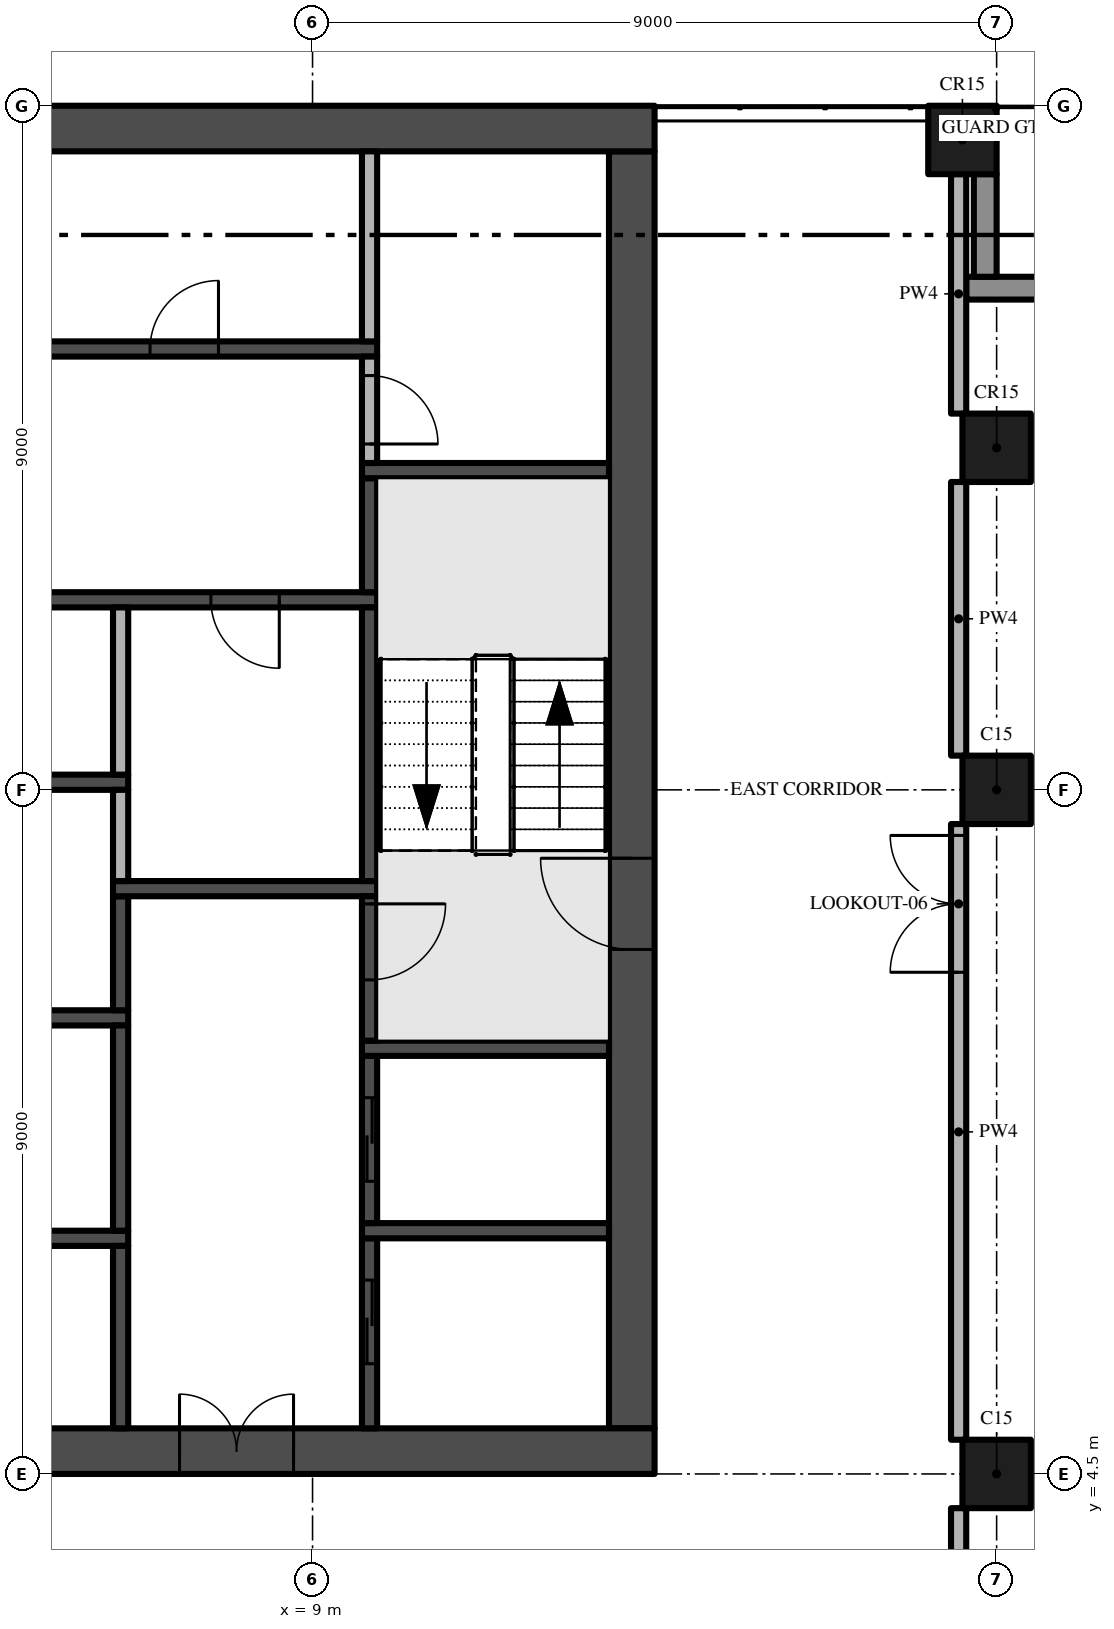
"""IFC4 building model, lengths in metres.
Left out: names, types, materials, properties, quantities, classifications, styles, units other than length and angle.
Written with IfcOpenShell. Run it as: python <this file> out.ifc"""

import sys

from ifc_helpers import new_model, si_unit, direction, frame, frame_2d, origin, origin_2d, place, context, subcontext, project, spatial, rectangle, extrude, element, fill, save


model = new_model("IFC4")
c1 = context("Model", 3, precision=1e-05, world=origin(), true_north=direction((0.0, 1.0)))
c2 = subcontext(c1, "Body", "Model", "MODEL_VIEW")
j1 = project(units=[si_unit("LENGTHUNIT", "METRE"), si_unit("PLANEANGLEUNIT", "RADIAN")], contexts=[c1])
p1 = place(None, origin())
s1 = spatial("IfcSite", under=j1, at=p1, CompositionType="ELEMENT")
p2 = place(p1, origin())
s2 = spatial("IfcBuilding", under=s1, at=p2, CompositionType="ELEMENT")
p3 = place(p2, frame((0.0, 0.0, 297.4)))
s3 = spatial("IfcBuildingStorey", under=s2, at=p3, CompositionType="ELEMENT", Elevation=297.4)
p4 = place(p3, frame((-13.5, 4.8, -0.3), z_axis=(0.0, 0.0, 1.0), x_axis=(1.0, 0.0, 0.0)))
e1 = element("IfcWall", 1, at=p4, inside=s3, PredefinedType="SHEAR", context=c2, shape_type="SweptSolid", body=[
    extrude(rectangle(XDim=27.0, YDim=0.6, at=frame_2d((13.5, 0.0))), origin(), (0.0, 0.0, 1.0), 5.95),
])
p5 = place(p4, frame((12.0, 0.0, 0.3)))
e2 = element("IfcOpeningElement", 2, at=p5, cuts=e1, PredefinedType="OPENING", context=c2, shape_type="SweptSolid", body=[
    extrude(rectangle(XDim=3.0, YDim=2.4, at=frame_2d((1.5, 1.2))), frame((0.0, 0.31, 0.0), z_axis=(0.0, -1.0, 0.0), x_axis=(1.0, 0.0, 0.0)), (0.0, 0.0, 1.0), 0.62),
])
p6 = place(p4, frame((4.9, 0.0, 0.3)))
e3 = element("IfcOpeningElement", 3, at=p6, cuts=e1, PredefinedType="OPENING", context=c2, shape_type="SweptSolid", body=[
    extrude(rectangle(XDim=1.2, YDim=2.2, at=frame_2d((0.6, 1.1))), frame((0.0, 0.31, 0.0), z_axis=(0.0, -1.0, 0.0), x_axis=(1.0, 0.0, 0.0)), (0.0, 0.0, 1.0), 0.62),
])
p7 = place(p4, frame((20.75, 0.0, 0.3)))
e4 = element("IfcOpeningElement", 4, at=p7, cuts=e1, PredefinedType="OPENING", context=c2, shape_type="SweptSolid", body=[
    extrude(rectangle(XDim=1.5, YDim=2.2, at=frame_2d((0.75, 1.1))), frame((0.0, 0.31, 0.0), z_axis=(0.0, -1.0, 0.0), x_axis=(1.0, 0.0, 0.0)), (0.0, 0.0, 1.0), 0.62),
])
p8 = place(p4, frame((17.4, 0.0, 0.3)))
e5 = element("IfcOpeningElement", 5, at=p8, cuts=e1, PredefinedType="OPENING", context=c2, shape_type="SweptSolid", body=[
    extrude(rectangle(XDim=1.2, YDim=2.2, at=frame_2d((0.6, 1.1))), frame((0.0, 0.31, 0.0), z_axis=(0.0, -1.0, 0.0), x_axis=(1.0, 0.0, 0.0)), (0.0, 0.0, 1.0), 0.62),
])
p9 = place(p3, frame((13.2, 5.1, -0.3), z_axis=(0.0, 0.0, 1.0), x_axis=(0.0, 1.0, 0.0)))
e6 = element("IfcWall", 6, at=p9, inside=s3, PredefinedType="SHEAR", context=c2, shape_type="SweptSolid", body=[
    extrude(rectangle(XDim=16.8, YDim=0.6, at=frame_2d((8.4, 0.0))), origin(), (0.0, 0.0, 1.0), 5.95),
])
p10 = place(p9, frame((6.3, 0.0, 0.3)))
e7 = element("IfcOpeningElement", 7, at=p10, cuts=e6, PredefinedType="OPENING", context=c2, shape_type="SweptSolid", body=[
    extrude(rectangle(XDim=1.2, YDim=2.2, at=frame_2d((0.6, 1.1))), frame((0.0, 0.31, 0.0), z_axis=(0.0, -1.0, 0.0), x_axis=(1.0, 0.0, 0.0)), (0.0, 0.0, 1.0), 0.62),
])
p11 = place(p3, frame((13.5, 22.2, -0.3), z_axis=(0.0, 0.0, 1.0), x_axis=(-1.0, 0.0, 0.0)))
e8 = element("IfcWall", 8, at=p11, inside=s3, PredefinedType="SHEAR", context=c2, shape_type="SweptSolid", body=[
    extrude(rectangle(XDim=27.0, YDim=0.6, at=frame_2d((13.5, 0.0))), origin(), (0.0, 0.0, 1.0), 5.95),
])
for number, where, z_axis, x_axis in (
    (9, (18.0, 13.5, 0.0), (0.0, 0.0, 1.0), (1.0, 0.0, 0.0)),
    (10, (17.55, 22.05, 0.0), (0.0, 0.0, 1.0), (1.0, 0.0, 0.0)),
    (11, (18.0, 4.5, 0.0), (0.0, 0.0, 1.0), (1.0, 0.0, 0.0)),
    (12, (18.0, 18.0, 0.0), (0.0, 0.0, 1.0), (1.0, 0.0, 0.0)),
):
    element("IfcColumn", number, at=place(p3, frame(where, z_axis=z_axis, x_axis=x_axis)), inside=s3, PredefinedType="COLUMN", context=c2, shape_type="SweptSolid", body=[
        extrude(rectangle(XDim=0.9, YDim=0.9, at=origin_2d()), origin(), (0.0, 0.0, 1.0), 5.65),
    ])
p12 = place(p3, frame((17.6, 20.1, 0.0), z_axis=(0.0, 0.0, 1.0), x_axis=(1.0, 0.0, 0.0)))
e13 = element("IfcWall", 13, at=p12, inside=s3, PredefinedType="SOLIDWALL", context=c2, shape_type="SweptSolid", body=[
    extrude(rectangle(XDim=2.35, YDim=0.3, at=frame_2d((1.175, 0.0))), origin(), (0.0, 0.0, 1.0), 5.65),
])
p13 = place(p3, frame((17.85, 21.6, 0.0), z_axis=(0.0, 0.0, 1.0), x_axis=(0.0, -1.0, 0.0)))
e14 = element("IfcWall", 14, at=p13, inside=s3, PredefinedType="SOLIDWALL", context=c2, shape_type="SweptSolid", body=[
    extrude(rectangle(XDim=1.35, YDim=0.3, at=frame_2d((0.675, 0.0))), origin(), (0.0, 0.0, 1.0), 5.65),
])
p14 = place(p3, frame((-9.85, 19.3, 0.0), z_axis=(0.0, 0.0, 1.0), x_axis=(1.0, 0.0, 0.0)))
e15 = element("IfcWall", 15, at=p14, inside=s3, PredefinedType="SHEAR", context=c2, shape_type="SweptSolid", body=[
    extrude(rectangle(XDim=19.7, YDim=0.2, at=frame_2d((9.85, 0.0))), origin(), (0.0, 0.0, 1.0), 5.65),
])
p15 = place(p14, frame((11.838, 0.0, 0.0)))
e16 = element("IfcOpeningElement", 16, at=p15, cuts=e15, PredefinedType="OPENING", context=c2, shape_type="SweptSolid", body=[
    extrude(rectangle(XDim=0.9, YDim=2.1, at=frame_2d((0.45, 1.05))), frame((0.0, 0.11, 0.0), z_axis=(0.0, -1.0, 0.0), x_axis=(1.0, 0.0, 0.0)), (0.0, 0.0, 1.0), 0.22),
])
p16 = place(p14, frame((16.712, 0.0, 0.0)))
e17 = element("IfcOpeningElement", 17, at=p16, cuts=e15, PredefinedType="OPENING", context=c2, shape_type="SweptSolid", body=[
    extrude(rectangle(XDim=0.9, YDim=2.1, at=frame_2d((0.45, 1.05))), frame((0.0, 0.11, 0.0), z_axis=(0.0, -1.0, 0.0), x_axis=(1.0, 0.0, 0.0)), (0.0, 0.0, 1.0), 0.22),
])
p17 = place(p14, frame((3.306, 0.0, 0.0)))
e18 = element("IfcOpeningElement", 18, at=p17, cuts=e15, PredefinedType="OPENING", context=c2, shape_type="SweptSolid", body=[
    extrude(rectangle(XDim=0.9, YDim=2.1, at=frame_2d((0.45, 1.05))), frame((0.0, 0.11, 0.0), z_axis=(0.0, -1.0, 0.0), x_axis=(1.0, 0.0, 0.0)), (0.0, 0.0, 1.0), 0.22),
])
p18 = place(p14, frame((8.181, 0.0, 0.0)))
e19 = element("IfcOpeningElement", 19, at=p18, cuts=e15, PredefinedType="OPENING", context=c2, shape_type="SweptSolid", body=[
    extrude(rectangle(XDim=0.9, YDim=2.1, at=frame_2d((0.45, 1.05))), frame((0.0, 0.11, 0.0), z_axis=(0.0, -1.0, 0.0), x_axis=(1.0, 0.0, 0.0)), (0.0, 0.0, 1.0), 0.22),
])
for number, where, z_axis, x_axis in (
    (20, (1.5, 7.6, 0.0), (0.0, 0.0, 1.0), (1.0, 0.0, 0.0)),
    (21, (1.5, 10.5, 0.0), (0.0, 0.0, 1.0), (1.0, 0.0, 0.0)),
    (22, (1.5, 13.6, 0.0), (0.0, 0.0, 1.0), (1.0, 0.0, 0.0)),
):
    element("IfcWall", number, at=place(p3, frame(where, z_axis=z_axis, x_axis=x_axis)), inside=s3, PredefinedType="SHEAR", context=c2, shape_type="SweptSolid", body=[
        extrude(rectangle(XDim=5.075, YDim=0.2, at=frame_2d((2.538, 0.0))), origin(), (0.0, 0.0, 1.0), 5.65),
    ])
p19 = place(p3, frame((9.85, 16.0, 0.0), z_axis=(0.0, 0.0, 1.0), x_axis=(-1.0, 0.0, 0.0)))
e23 = element("IfcWall", 23, at=p19, inside=s3, PredefinedType="SHEAR", context=c2, shape_type="SweptSolid", body=[
    extrude(rectangle(XDim=8.35, YDim=0.2, at=frame_2d((4.175, 0.0))), origin(), (0.0, 0.0, 1.0), 5.65),
])
p20 = place(p19, frame((1.288, 0.0, 0.0)))
e24 = element("IfcOpeningElement", 24, at=p20, cuts=e23, PredefinedType="OPENING", context=c2, shape_type="SweptSolid", body=[
    extrude(rectangle(XDim=0.9, YDim=2.1, at=frame_2d((0.45, 1.05))), frame((0.0, 0.11, 0.0), z_axis=(0.0, -1.0, 0.0), x_axis=(1.0, 0.0, 0.0)), (0.0, 0.0, 1.0), 0.22),
])
p21 = place(p3, frame((6.475, 5.1, 0.0), z_axis=(0.0, 0.0, 1.0), x_axis=(0.0, 1.0, 0.0)))
e25 = element("IfcWall", 25, at=p21, inside=s3, PredefinedType="SHEAR", context=c2, shape_type="SweptSolid", body=[
    extrude(rectangle(XDim=2.4, YDim=0.2, at=frame_2d((1.2, 0.0))), origin(), (0.0, 0.0, 1.0), 5.65),
])
p22 = place(p3, frame((6.475, 7.7, 0.0), z_axis=(0.0, 0.0, 1.0), x_axis=(0.0, 1.0, 0.0)))
e26 = element("IfcWall", 26, at=p22, inside=s3, PredefinedType="SHEAR", context=c2, shape_type="SweptSolid", body=[
    extrude(rectangle(XDim=2.7, YDim=0.2, at=frame_2d((1.35, 0.0))), origin(), (0.0, 0.0, 1.0), 5.65),
])
p23 = place(p3, frame((6.475, 10.6, 0.0), z_axis=(0.0, 0.0, 1.0), x_axis=(0.0, 1.0, 0.0)))
e27 = element("IfcWall", 27, at=p23, inside=s3, PredefinedType="SHEAR", context=c2, shape_type="SweptSolid", body=[
    extrude(rectangle(XDim=1.5, YDim=0.2, at=frame_2d((0.75, 0.0))), origin(), (0.0, 0.0, 1.0), 5.65),
])
p24 = place(p3, frame((6.375, 12.2, 0.0), z_axis=(0.0, 0.0, 1.0), x_axis=(1.0, 0.0, 0.0)))
e28 = element("IfcWall", 28, at=p24, inside=s3, PredefinedType="SHEAR", context=c2, shape_type="SweptSolid", body=[
    extrude(rectangle(XDim=3.475, YDim=0.2, at=frame_2d((1.738, 0.0))), origin(), (0.0, 0.0, 1.0), 5.65),
])
p25 = place(p3, frame((6.475, 12.3, 0.0), z_axis=(0.0, 0.0, 1.0), x_axis=(0.0, 1.0, 0.0)))
e29 = element("IfcWall", 29, at=p25, inside=s3, PredefinedType="PARTITIONING", context=c2, shape_type="SweptSolid", body=[
    extrude(rectangle(XDim=1.2, YDim=0.2, at=frame_2d((0.6, 0.0))), origin(), (0.0, 0.0, 1.0), 5.65),
])
p26 = place(p3, frame((6.475, 13.7, 0.0), z_axis=(0.0, 0.0, 1.0), x_axis=(0.0, 1.0, 0.0)))
e30 = element("IfcWall", 30, at=p26, inside=s3, PredefinedType="PARTITIONING", context=c2, shape_type="SweptSolid", body=[
    extrude(rectangle(XDim=2.2, YDim=0.2, at=frame_2d((1.1, 0.0))), origin(), (0.0, 0.0, 1.0), 5.65),
])
p27 = place(p3, frame((9.75, 5.1, 0.0), z_axis=(0.0, 0.0, 1.0), x_axis=(0.0, 1.0, 0.0)))
e31 = element("IfcWall", 31, at=p27, inside=s3, PredefinedType="SHEAR", context=c2, shape_type="SweptSolid", body=[
    extrude(rectangle(XDim=2.5, YDim=0.2, at=frame_2d((1.25, 0.0))), origin(), (0.0, 0.0, 1.0), 5.65),
])
p28 = place(p27, frame((0.85, 0.0, 0.0)))
e32 = element("IfcOpeningElement", 32, at=p28, cuts=e31, PredefinedType="OPENING", context=c2, shape_type="SweptSolid", body=[
    extrude(rectangle(XDim=1.1, YDim=2.1, at=frame_2d((0.55, 1.05))), frame((0.0, 0.11, 0.0), z_axis=(0.0, -1.0, 0.0), x_axis=(1.0, 0.0, 0.0)), (0.0, 0.0, 1.0), 0.22),
])
p29 = place(p3, frame((9.65, 7.7, 0.0), z_axis=(0.0, 0.0, 1.0), x_axis=(1.0, 0.0, 0.0)))
e33 = element("IfcWall", 33, at=p29, inside=s3, PredefinedType="SHEAR", context=c2, shape_type="SweptSolid", body=[
    extrude(rectangle(XDim=3.25, YDim=0.2, at=frame_2d((1.625, 0.0))), origin(), (0.0, 0.0, 1.0), 5.65),
])
p30 = place(p3, frame((9.75, 7.8, 0.0), z_axis=(0.0, 0.0, 1.0), x_axis=(0.0, 1.0, 0.0)))
e34 = element("IfcWall", 34, at=p30, inside=s3, PredefinedType="SHEAR", context=c2, shape_type="SweptSolid", body=[
    extrude(rectangle(XDim=2.2, YDim=0.2, at=frame_2d((1.1, 0.0))), origin(), (0.0, 0.0, 1.0), 5.65),
])
p31 = place(p30, frame((0.55, 0.0, 0.0)))
e35 = element("IfcOpeningElement", 35, at=p31, cuts=e34, PredefinedType="OPENING", context=c2, shape_type="SweptSolid", body=[
    extrude(rectangle(XDim=1.1, YDim=2.1, at=frame_2d((0.55, 1.05))), frame((0.0, 0.11, 0.0), z_axis=(0.0, -1.0, 0.0), x_axis=(1.0, 0.0, 0.0)), (0.0, 0.0, 1.0), 0.22),
])
p32 = place(p3, frame((9.65, 10.1, 0.0), z_axis=(0.0, 0.0, 1.0), x_axis=(1.0, 0.0, 0.0)))
e36 = element("IfcWall", 36, at=p32, inside=s3, PredefinedType="SHEAR", context=c2, shape_type="SweptSolid", body=[
    extrude(rectangle(XDim=3.25, YDim=0.2, at=frame_2d((1.625, 0.0))), origin(), (0.0, 0.0, 1.0), 5.65),
])
p33 = place(p3, frame((9.75, 12.1, 0.0), z_axis=(0.0, 0.0, 1.0), x_axis=(0.0, -1.0, 0.0)))
e37 = element("IfcWall", 37, at=p33, inside=s3, PredefinedType="SHEAR", context=c2, shape_type="SweptSolid", body=[
    extrude(rectangle(XDim=1.9, YDim=0.2, at=frame_2d((0.95, 0.0))), origin(), (0.0, 0.0, 1.0), 5.65),
])
p34 = place(p33, frame((0.1, 0.0, 0.0)))
e38 = element("IfcOpeningElement", 38, at=p34, cuts=e37, PredefinedType="OPENING", context=c2, shape_type="SweptSolid", body=[
    extrude(rectangle(XDim=1.0, YDim=2.2, at=frame_2d((0.5, 1.1))), frame((0.0, 0.11, 0.0), z_axis=(0.0, -1.0, 0.0), x_axis=(1.0, 0.0, 0.0)), (0.0, 0.0, 1.0), 0.22),
])
p35 = place(p3, frame((9.75, 12.3, 0.0), z_axis=(0.0, 0.0, 1.0), x_axis=(0.0, 1.0, 0.0)))
e39 = element("IfcWall", 39, at=p35, inside=s3, PredefinedType="SHEAR", context=c2, shape_type="SweptSolid", body=[
    extrude(rectangle(XDim=3.6, YDim=0.2, at=frame_2d((1.8, 0.0))), origin(), (0.0, 0.0, 1.0), 5.65),
])
p36 = place(p3, frame((9.75, 16.1, 0.0), z_axis=(0.0, 0.0, 1.0), x_axis=(0.0, 1.0, 0.0)))
e40 = element("IfcWall", 40, at=p36, inside=s3, PredefinedType="SHEAR", context=c2, shape_type="SweptSolid", body=[
    extrude(rectangle(XDim=1.5, YDim=0.2, at=frame_2d((0.75, 0.0))), origin(), (0.0, 0.0, 1.0), 5.65),
])
p37 = place(p3, frame((9.65, 17.7, 0.0), z_axis=(0.0, 0.0, 1.0), x_axis=(1.0, 0.0, 0.0)))
e41 = element("IfcWall", 41, at=p37, inside=s3, PredefinedType="SHEAR", context=c2, shape_type="SweptSolid", body=[
    extrude(rectangle(XDim=3.25, YDim=0.2, at=frame_2d((1.625, 0.0))), origin(), (0.0, 0.0, 1.0), 5.65),
])
p38 = place(p3, frame((9.75, 19.2, 0.0), z_axis=(0.0, 0.0, 1.0), x_axis=(0.0, -1.0, 0.0)))
e42 = element("IfcWall", 42, at=p38, inside=s3, PredefinedType="PARTITIONING", context=c2, shape_type="SweptSolid", body=[
    extrude(rectangle(XDim=1.4, YDim=0.2, at=frame_2d((0.7, 0.0))), origin(), (0.0, 0.0, 1.0), 5.65),
])
p39 = place(p38, frame((0.25, 0.0, 0.0)))
e43 = element("IfcOpeningElement", 43, at=p39, cuts=e42, PredefinedType="OPENING", context=c2, shape_type="SweptSolid", body=[
    extrude(rectangle(XDim=0.9, YDim=2.1, at=frame_2d((0.45, 1.05))), frame((0.0, 0.11, 0.0), z_axis=(0.0, -1.0, 0.0), x_axis=(1.0, 0.0, 0.0)), (0.0, 0.0, 1.0), 0.22),
])
p40 = place(p3, frame((9.75, 19.4, 0.0), z_axis=(0.0, 0.0, 1.0), x_axis=(0.0, 1.0, 0.0)))
e44 = element("IfcWall", 44, at=p40, inside=s3, PredefinedType="PARTITIONING", context=c2, shape_type="SweptSolid", body=[
    extrude(rectangle(XDim=2.5, YDim=0.2, at=frame_2d((1.25, 0.0))), origin(), (0.0, 0.0, 1.0), 5.65),
])
p41 = place(p3, frame((17.5, -0.175, 0.0), z_axis=(0.0, 0.0, 1.0), x_axis=(0.0, 1.0, 0.0)))
e45 = element("IfcWall", 45, at=p41, inside=s3, PredefinedType="PARTITIONING", context=c2, shape_type="SweptSolid", body=[
    extrude(rectangle(XDim=4.225, YDim=0.2, at=frame_2d((2.112, 0.0))), origin(), (0.0, 0.0, 1.0), 5.65),
])
p42 = place(p3, frame((17.5, 4.95, 0.0), z_axis=(0.0, 0.0, 1.0), x_axis=(0.0, 1.0, 0.0)))
e46 = element("IfcWall", 46, at=p42, inside=s3, PredefinedType="PARTITIONING", context=c2, shape_type="SweptSolid", body=[
    extrude(rectangle(XDim=8.1, YDim=0.2, at=frame_2d((4.05, 0.0))), origin(), (0.0, 0.0, 1.0), 5.65),
])
p43 = place(p42, frame((6.15, 0.0, 0.0)))
e47 = element("IfcOpeningElement", 47, at=p43, cuts=e46, PredefinedType="OPENING", context=c2, shape_type="SweptSolid", body=[
    extrude(rectangle(XDim=1.8, YDim=2.4, at=frame_2d((0.9, 1.2))), frame((0.0, 0.11, 0.0), z_axis=(0.0, -1.0, 0.0), x_axis=(1.0, 0.0, 0.0)), (0.0, 0.0, 1.0), 0.22),
])
p44 = place(p3, frame((17.5, 13.95, 0.0), z_axis=(0.0, 0.0, 1.0), x_axis=(0.0, 1.0, 0.0)))
e48 = element("IfcWall", 48, at=p44, inside=s3, PredefinedType="PARTITIONING", context=c2, shape_type="SweptSolid", body=[
    extrude(rectangle(XDim=3.6, YDim=0.2, at=frame_2d((1.8, 0.0))), origin(), (0.0, 0.0, 1.0), 5.65),
])
p45 = place(p3, frame((17.5, 18.45, 0.0), z_axis=(0.0, 0.0, 1.0), x_axis=(0.0, 1.0, 0.0)))
e49 = element("IfcWall", 49, at=p45, inside=s3, PredefinedType="PARTITIONING", context=c2, shape_type="SweptSolid", body=[
    extrude(rectangle(XDim=3.15, YDim=0.2, at=frame_2d((1.575, 0.0))), origin(), (0.0, 0.0, 1.0), 5.65),
])
p46 = place(p10, frame((1.2, 0.0, 0.0), z_axis=(0.0, 0.0, 1.0), x_axis=(-1.0, 0.0, 0.0)))
e50 = element("IfcDoor", 50, at=p46, inside=s3, OperationType="SINGLE_SWING_LEFT", PredefinedType="DOOR", context=c2, shape_type="SweptSolid", body=[
    extrude(rectangle(XDim=1.2, YDim=2.2, at=frame_2d((0.6, 1.1))), frame((0.0, 0.025, 0.0), z_axis=(0.0, -1.0, 0.0), x_axis=(1.0, 0.0, 0.0)), (0.0, 0.0, 1.0), 0.05),
])
fill(e7, e50)
p47 = place(p7, frame((1.5, 0.0, 0.0), z_axis=(0.0, 0.0, 1.0), x_axis=(-1.0, 0.0, 0.0)))
e51 = element("IfcDoor", 51, at=p47, inside=s3, OperationType="DOUBLE_DOOR_SINGLE_SWING", PredefinedType="DOOR", context=c2, shape_type="SweptSolid", body=[
    extrude(rectangle(XDim=1.5, YDim=2.2, at=frame_2d((0.75, 1.1))), frame((0.0, 0.025, 0.0), z_axis=(0.0, -1.0, 0.0), x_axis=(1.0, 0.0, 0.0)), (0.0, 0.0, 1.0), 0.05),
])
fill(e4, e51)
p48 = place(p34, origin())
e52 = element("IfcDoor", 52, at=p48, inside=s3, OperationType="SINGLE_SWING_LEFT", PredefinedType="DOOR", context=c2, shape_type="SweptSolid", body=[
    extrude(rectangle(XDim=1.0, YDim=2.2, at=frame_2d((0.5, 1.1))), frame((0.0, 0.025, 0.0), z_axis=(0.0, -1.0, 0.0), x_axis=(1.0, 0.0, 0.0)), (0.0, 0.0, 1.0), 0.05),
])
fill(e38, e52)
p49 = place(p28, origin())
e53 = element("IfcDoor", 53, at=p49, inside=s3, OperationType="SLIDING_TO_RIGHT", PredefinedType="DOOR", context=c2, shape_type="SweptSolid", body=[
    extrude(rectangle(XDim=1.1, YDim=2.1, at=frame_2d((0.55, 1.05))), frame((0.0, 0.025, 0.0), z_axis=(0.0, -1.0, 0.0), x_axis=(1.0, 0.0, 0.0)), (0.0, 0.0, 1.0), 0.05),
])
fill(e32, e53)
p50 = place(p31, origin())
e54 = element("IfcDoor", 54, at=p50, inside=s3, OperationType="SLIDING_TO_RIGHT", PredefinedType="DOOR", context=c2, shape_type="SweptSolid", body=[
    extrude(rectangle(XDim=1.1, YDim=2.1, at=frame_2d((0.55, 1.05))), frame((0.0, 0.025, 0.0), z_axis=(0.0, -1.0, 0.0), x_axis=(1.0, 0.0, 0.0)), (0.0, 0.0, 1.0), 0.05),
])
fill(e35, e54)
p51 = place(p20, origin())
e55 = element("IfcDoor", 55, at=p51, inside=s3, OperationType="SINGLE_SWING_LEFT", PredefinedType="DOOR", context=c2, shape_type="SweptSolid", body=[
    extrude(rectangle(XDim=0.9, YDim=2.1, at=frame_2d((0.45, 1.05))), frame((0.0, 0.025, 0.0), z_axis=(0.0, -1.0, 0.0), x_axis=(1.0, 0.0, 0.0)), (0.0, 0.0, 1.0), 0.05),
])
fill(e24, e55)
p52 = place(p39, origin())
e56 = element("IfcDoor", 56, at=p52, inside=s3, OperationType="SINGLE_SWING_RIGHT", PredefinedType="DOOR", context=c2, shape_type="SweptSolid", body=[
    extrude(rectangle(XDim=0.9, YDim=2.1, at=frame_2d((0.45, 1.05))), frame((0.0, 0.025, 0.0), z_axis=(0.0, -1.0, 0.0), x_axis=(1.0, 0.0, 0.0)), (0.0, 0.0, 1.0), 0.05),
])
fill(e43, e56)
p53 = place(p16, origin())
e57 = element("IfcDoor", 57, at=p53, inside=s3, OperationType="SINGLE_SWING_RIGHT", PredefinedType="DOOR", context=c2, shape_type="SweptSolid", body=[
    extrude(rectangle(XDim=0.9, YDim=2.1, at=frame_2d((0.45, 1.05))), frame((0.0, 0.025, 0.0), z_axis=(0.0, -1.0, 0.0), x_axis=(1.0, 0.0, 0.0)), (0.0, 0.0, 1.0), 0.05),
])
fill(e17, e57)
p54 = place(p43, origin())
e58 = element("IfcDoor", 58, at=p54, inside=s3, OperationType="DOUBLE_DOOR_SINGLE_SWING", PredefinedType="DOOR", context=c2, shape_type="SweptSolid", body=[
    extrude(rectangle(XDim=1.8, YDim=2.4, at=frame_2d((0.9, 1.2))), frame((0.0, 0.025, 0.0), z_axis=(0.0, -1.0, 0.0), x_axis=(1.0, 0.0, 0.0)), (0.0, 0.0, 1.0), 0.05),
])
fill(e47, e58)
save(model, sys.argv[1])
